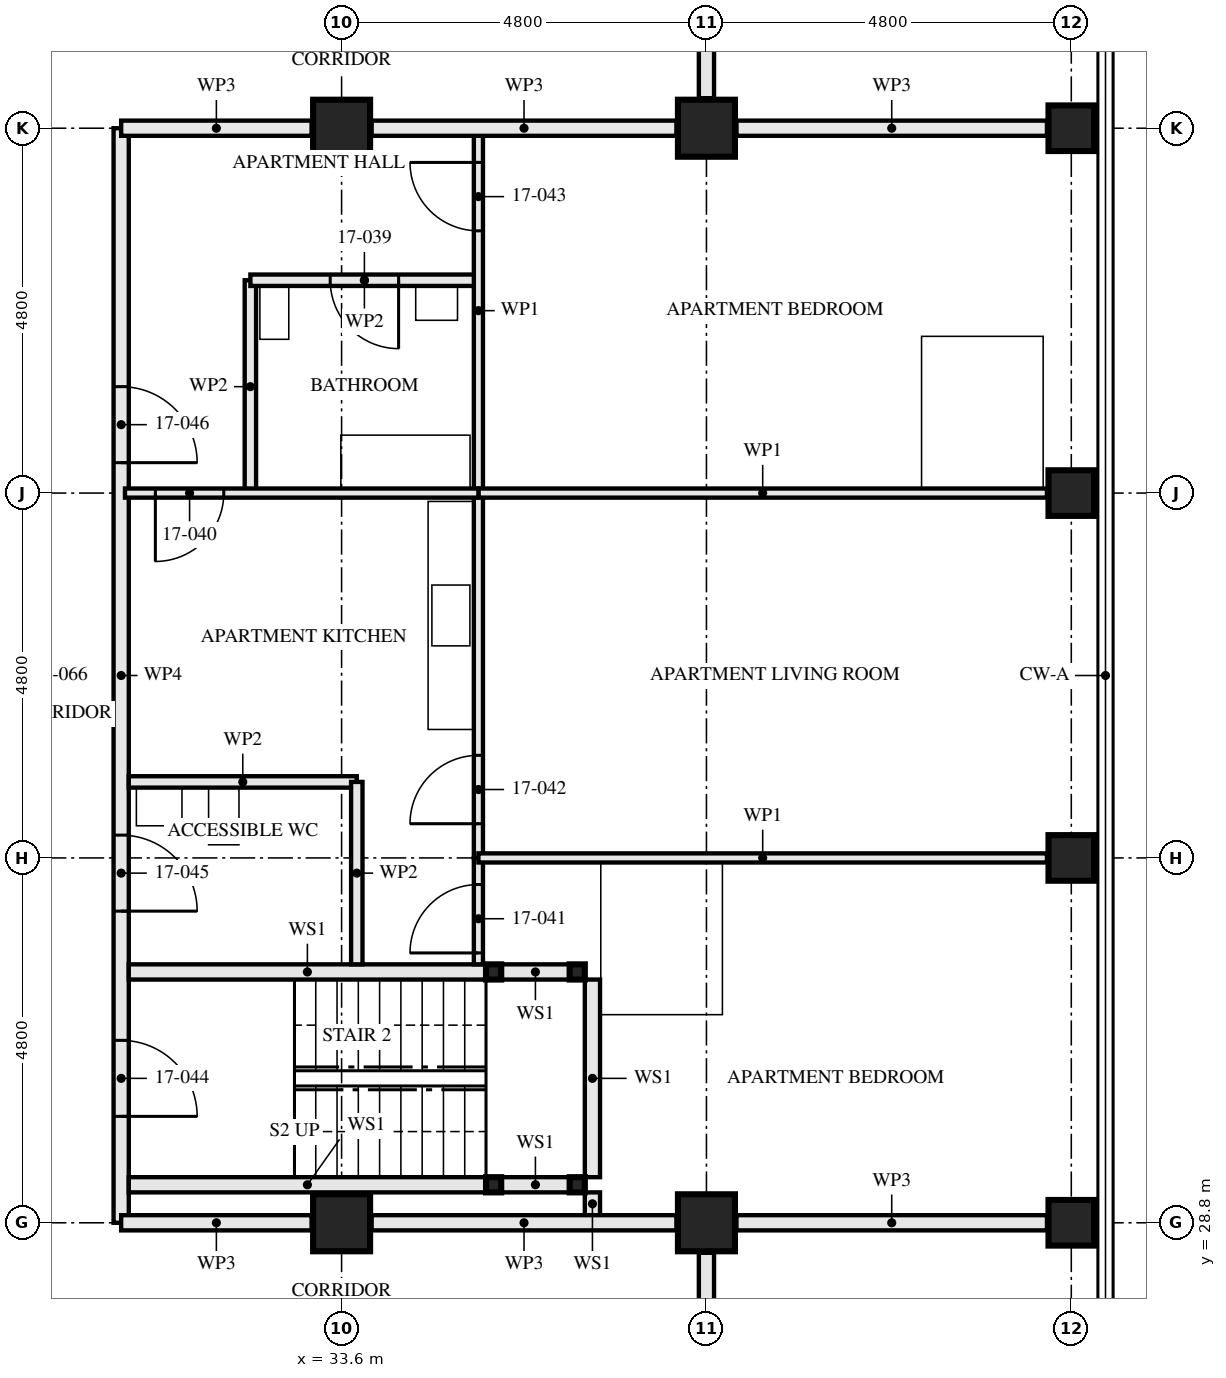
"""IFC4 building model, lengths in metres.
Left out: names, types, materials, properties, quantities, classifications, styles, units other than length and angle.
Written with IfcOpenShell. Run it as: python <this file> out.ifc"""

import sys

from ifc_helpers import new_model, si_unit, direction, frame, frame_2d, origin, origin_2d, place, context, subcontext, project, spatial, rectangle, hollow_rectangle, extrude, element, fill, save


model = new_model("IFC4")
c1 = context("Model", 3, precision=1e-05, world=origin(), true_north=direction((0.0, 1.0)))
c2 = subcontext(c1, "Body", "Model", "MODEL_VIEW")
j1 = project(units=[si_unit("LENGTHUNIT", "METRE"), si_unit("PLANEANGLEUNIT", "RADIAN")], contexts=[c1])
p1 = place(None, origin())
s1 = spatial("IfcSite", under=j1, at=p1, CompositionType="ELEMENT")
p2 = place(p1, origin())
s2 = spatial("IfcBuilding", under=s1, at=p2, CompositionType="ELEMENT")
p3 = place(p2, frame((0.0, 0.0, 65.5)))
s3 = spatial("IfcBuildingStorey", under=s2, at=p3, CompositionType="ELEMENT", Elevation=65.5)
for number, where, z_axis, x_axis in (
    (1, (33.6, 28.8, 0.0), (0.0, 0.0, 1.0), (0.0, 1.0, 0.0)),
    (2, (33.6, 43.2, 0.0), (0.0, 0.0, 1.0), (0.0, 1.0, 0.0)),
    (3, (38.4, 28.8, 0.0), (0.0, 0.0, 1.0), (0.0, 1.0, 0.0)),
    (4, (38.4, 43.2, 0.0), (0.0, 0.0, 1.0), (0.0, 1.0, 0.0)),
):
    element("IfcColumn", number, at=place(p3, frame(where, z_axis=z_axis, x_axis=x_axis)), inside=s3, PredefinedType="COLUMN", context=c2, shape_type="SweptSolid", body=[
        extrude(hollow_rectangle(XDim=0.75, YDim=0.75, WallThickness=0.08, at=origin_2d()), origin(), (0.0, 0.0, 1.0), 3.5),
    ])
for number, where, z_axis, x_axis in (
    (5, (43.2, 28.8, 0.0), (0.0, 0.0, 1.0), (0.0, 1.0, 0.0)),
    (6, (43.2, 33.6, 0.0), (0.0, 0.0, 1.0), (1.0, 0.0, 0.0)),
    (7, (43.2, 38.4, 0.0), (0.0, 0.0, 1.0), (1.0, 0.0, 0.0)),
    (8, (43.2, 43.2, 0.0), (0.0, 0.0, 1.0), (0.0, 1.0, 0.0)),
):
    element("IfcColumn", number, at=place(p3, frame(where, z_axis=z_axis, x_axis=x_axis)), inside=s3, PredefinedType="COLUMN", context=c2, shape_type="SweptSolid", body=[
        extrude(hollow_rectangle(XDim=0.6, YDim=0.6, WallThickness=0.08, at=origin_2d()), origin(), (0.0, 0.0, 1.0), 3.5),
    ])
for number, where, z_axis, x_axis in (
    (9, (36.7, 29.3, 0.0), (0.0, 0.0, 1.0), (1.0, 0.0, 0.0)),
    (10, (36.7, 32.1, 0.0), (0.0, 0.0, 1.0), (1.0, 0.0, 0.0)),
    (11, (35.6, 29.3, 0.0), (0.0, 0.0, 1.0), (1.0, 0.0, 0.0)),
    (12, (35.6, 32.1, 0.0), (0.0, 0.0, 1.0), (1.0, 0.0, 0.0)),
):
    element("IfcColumn", number, at=place(p3, frame(where, z_axis=z_axis, x_axis=x_axis)), inside=s3, PredefinedType="COLUMN", context=c2, shape_type="SweptSolid", body=[
        extrude(hollow_rectangle(XDim=0.2, YDim=0.2, WallThickness=0.008, at=origin_2d()), origin(), (0.0, 0.0, 1.0), 3.33),
    ])
p4 = place(p3, frame((38.4, 26.8, 0.0), z_axis=(0.0, 0.0, 1.0), x_axis=(0.0, 1.0, 0.0)))
e13 = element("IfcWall", 13, at=p4, inside=s3, PredefinedType="PARTITIONING", context=c2, shape_type="SweptSolid", body=[
    extrude(rectangle(XDim=1.605, YDim=0.2, at=frame_2d((0.802, 0.0))), origin(), (0.0, 0.0, 1.0), 3.33),
])
p5 = place(p3, frame((36.6, 29.3, 0.0), z_axis=(0.0, 0.0, 1.0), x_axis=(-1.0, 0.0, 0.0)))
e14 = element("IfcWall", 14, at=p5, inside=s3, PredefinedType="SOLIDWALL", context=c2, shape_type="SweptSolid", body=[
    extrude(rectangle(XDim=0.9, YDim=0.2, at=frame_2d((0.45, 0.0))), origin(), (0.0, 0.0, 1.0), 2.99),
])
p6 = place(p3, frame((35.5, 29.3, 0.0), z_axis=(0.0, 0.0, 1.0), x_axis=(-1.0, 0.0, 0.0)))
e15 = element("IfcWall", 15, at=p6, inside=s3, PredefinedType="SOLIDWALL", context=c2, shape_type="SweptSolid", body=[
    extrude(rectangle(XDim=4.7, YDim=0.2, at=frame_2d((2.35, 0.0))), origin(), (0.0, 0.0, 1.0), 2.99),
])
p7 = place(p3, frame((36.6, 32.1, 0.0), z_axis=(0.0, 0.0, 1.0), x_axis=(-1.0, 0.0, 0.0)))
e16 = element("IfcWall", 16, at=p7, inside=s3, PredefinedType="SOLIDWALL", context=c2, shape_type="SweptSolid", body=[
    extrude(rectangle(XDim=0.9, YDim=0.2, at=frame_2d((0.45, 0.0))), origin(), (0.0, 0.0, 1.0), 2.99),
])
p8 = place(p3, frame((35.5, 32.1, 0.0), z_axis=(0.0, 0.0, 1.0), x_axis=(-1.0, 0.0, 0.0)))
e17 = element("IfcWall", 17, at=p8, inside=s3, PredefinedType="SOLIDWALL", context=c2, shape_type="SweptSolid", body=[
    extrude(rectangle(XDim=4.7, YDim=0.2, at=frame_2d((2.35, 0.0))), origin(), (0.0, 0.0, 1.0), 2.99),
])
p9 = place(p3, frame((36.9, 28.9, 0.0), z_axis=(0.0, 0.0, 1.0), x_axis=(0.0, 1.0, 0.0)))
e18 = element("IfcWall", 18, at=p9, inside=s3, PredefinedType="SOLIDWALL", context=c2, shape_type="SweptSolid", body=[
    extrude(rectangle(XDim=0.3, YDim=0.2, at=frame_2d((0.15, 0.0))), origin(), (0.0, 0.0, 1.0), 3.33),
])
p10 = place(p3, frame((36.9, 29.4, 0.0), z_axis=(0.0, 0.0, 1.0), x_axis=(0.0, 1.0, 0.0)))
e19 = element("IfcWall", 19, at=p10, inside=s3, PredefinedType="SOLIDWALL", context=c2, shape_type="SweptSolid", body=[
    extrude(rectangle(XDim=2.6, YDim=0.2, at=frame_2d((1.3, 0.0))), origin(), (0.0, 0.0, 1.0), 3.33),
])
p11 = place(p3, frame((33.8, 32.2, 0.0), z_axis=(0.0, 0.0, 1.0), x_axis=(0.0, 1.0, 0.0)))
e20 = element("IfcWall", 20, at=p11, inside=s3, PredefinedType="PARTITIONING", context=c2, shape_type="SweptSolid", body=[
    extrude(rectangle(XDim=2.4, YDim=0.15, at=frame_2d((1.2, 0.0))), origin(), (0.0, 0.0, 1.0), 2.55),
])
p12 = place(p3, frame((33.8, 34.6, 0.0), z_axis=(0.0, 0.0, 1.0), x_axis=(-1.0, 0.0, 0.0)))
e21 = element("IfcWall", 21, at=p12, inside=s3, PredefinedType="PARTITIONING", context=c2, shape_type="SweptSolid", body=[
    extrude(rectangle(XDim=3.0, YDim=0.15, at=frame_2d((1.5, 0.0))), origin(), (0.0, 0.0, 1.0), 3.33),
])
p13 = place(p3, frame((35.4, 41.2, 0.0), z_axis=(0.0, 0.0, 1.0), x_axis=(-1.0, 0.0, 0.0)))
e22 = element("IfcWall", 22, at=p13, inside=s3, PredefinedType="PARTITIONING", context=c2, shape_type="SweptSolid", body=[
    extrude(rectangle(XDim=3.0, YDim=0.15, at=frame_2d((1.5, 0.0))), origin(), (0.0, 0.0, 1.0), 3.33),
])
p14 = place(p13, frame((1.05, 0.0, 0.0)))
e23 = element("IfcOpeningElement", 23, at=p14, cuts=e22, PredefinedType="OPENING", context=c2, shape_type="SweptSolid", body=[
    extrude(rectangle(XDim=0.9, YDim=2.1, at=frame_2d((0.45, 1.05))), frame((0.0, 0.085, 0.0), z_axis=(0.0, -1.0, 0.0), x_axis=(1.0, 0.0, 0.0)), (0.0, 0.0, 1.0), 0.171),
])
p15 = place(p3, frame((32.4, 38.4, 0.0), z_axis=(0.0, 0.0, 1.0), x_axis=(0.0, 1.0, 0.0)))
e24 = element("IfcWall", 24, at=p15, inside=s3, PredefinedType="PARTITIONING", context=c2, shape_type="SweptSolid", body=[
    extrude(rectangle(XDim=2.8, YDim=0.15, at=frame_2d((1.4, 0.0))), origin(), (0.0, 0.0, 1.0), 3.33),
])
p16 = place(p3, frame((35.4, 38.4, 0.0), z_axis=(0.0, 0.0, 1.0), x_axis=(-1.0, 0.0, 0.0)))
e25 = element("IfcWall", 25, at=p16, inside=s3, PredefinedType="PARTITIONING", context=c2, shape_type="SweptSolid", body=[
    extrude(rectangle(XDim=4.65, YDim=0.12, at=frame_2d((2.325, 0.0))), origin(), (0.0, 0.0, 1.0), 2.55),
])
p17 = place(p16, frame((3.35, 0.0, 0.0)))
e26 = element("IfcOpeningElement", 26, at=p17, cuts=e25, PredefinedType="OPENING", context=c2, shape_type="SweptSolid", body=[
    extrude(rectangle(XDim=0.9, YDim=2.1, at=frame_2d((0.45, 1.05))), frame((0.0, 0.071, 0.0), z_axis=(0.0, -1.0, 0.0), x_axis=(1.0, 0.0, 0.0)), (0.0, 0.0, 1.0), 0.141),
])
p18 = place(p3, frame((35.4, 32.2, 0.0), z_axis=(0.0, 0.0, 1.0), x_axis=(0.0, 1.0, 0.0)))
e27 = element("IfcWall", 27, at=p18, inside=s3, PredefinedType="PARTITIONING", context=c2, shape_type="SweptSolid", body=[
    extrude(rectangle(XDim=1.4, YDim=0.12, at=frame_2d((0.7, 0.0))), origin(), (0.0, 0.0, 1.0), 3.33),
])
p19 = place(p18, frame((0.15, 0.0, 0.0)))
e28 = element("IfcOpeningElement", 28, at=p19, cuts=e27, PredefinedType="OPENING", context=c2, shape_type="SweptSolid", body=[
    extrude(rectangle(XDim=0.9, YDim=2.1, at=frame_2d((0.45, 1.05))), frame((0.0, 0.071, 0.0), z_axis=(0.0, -1.0, 0.0), x_axis=(1.0, 0.0, 0.0)), (0.0, 0.0, 1.0), 0.141),
])
p20 = place(p3, frame((35.4, 33.6, 0.0), z_axis=(0.0, 0.0, 1.0), x_axis=(0.0, 1.0, 0.0)))
e29 = element("IfcWall", 29, at=p20, inside=s3, PredefinedType="PARTITIONING", context=c2, shape_type="SweptSolid", body=[
    extrude(rectangle(XDim=4.8, YDim=0.12, at=frame_2d((2.4, 0.0))), origin(), (0.0, 0.0, 1.0), 3.33),
])
p21 = place(p20, frame((0.45, 0.0, 0.0)))
e30 = element("IfcOpeningElement", 30, at=p21, cuts=e29, PredefinedType="OPENING", context=c2, shape_type="SweptSolid", body=[
    extrude(rectangle(XDim=0.9, YDim=2.1, at=frame_2d((0.45, 1.05))), frame((0.0, 0.071, 0.0), z_axis=(0.0, -1.0, 0.0), x_axis=(1.0, 0.0, 0.0)), (0.0, 0.0, 1.0), 0.141),
])
p22 = place(p3, frame((35.4, 38.4, 0.0), z_axis=(0.0, 0.0, 1.0), x_axis=(0.0, 1.0, 0.0)))
e31 = element("IfcWall", 31, at=p22, inside=s3, PredefinedType="PARTITIONING", context=c2, shape_type="SweptSolid", body=[
    extrude(rectangle(XDim=4.8, YDim=0.12, at=frame_2d((2.4, 0.0))), origin(), (0.0, 0.0, 1.0), 3.33),
])
p23 = place(p22, frame((3.45, 0.0, 0.0)))
e32 = element("IfcOpeningElement", 32, at=p23, cuts=e31, PredefinedType="OPENING", context=c2, shape_type="SweptSolid", body=[
    extrude(rectangle(XDim=0.9, YDim=2.1, at=frame_2d((0.45, 1.05))), frame((0.0, 0.071, 0.0), z_axis=(0.0, -1.0, 0.0), x_axis=(1.0, 0.0, 0.0)), (0.0, 0.0, 1.0), 0.141),
])
for number, where, z_axis, x_axis in (
    (33, (42.88, 33.6, 0.0), (0.0, 0.0, 1.0), (-1.0, 0.0, 0.0)),
    (34, (42.88, 38.4, 0.0), (0.0, 0.0, 1.0), (-1.0, 0.0, 0.0)),
):
    element("IfcWall", number, at=place(p3, frame(where, z_axis=z_axis, x_axis=x_axis)), inside=s3, PredefinedType="PARTITIONING", context=c2, shape_type="SweptSolid", body=[
        extrude(rectangle(XDim=7.48, YDim=0.12, at=frame_2d((3.74, 0.0))), origin(), (0.0, 0.0, 1.0), 2.55),
    ])
p24 = place(p3, frame((30.7, 28.8, 0.0), z_axis=(0.0, 0.0, 1.0), x_axis=(0.0, 1.0, 0.0)))
e35 = element("IfcWall", 35, at=p24, inside=s3, PredefinedType="PARTITIONING", context=c2, shape_type="SweptSolid", body=[
    extrude(rectangle(XDim=14.4, YDim=0.2, at=frame_2d((7.2, 0.0))), origin(), (0.0, 0.0, 1.0), 2.55),
])
p25 = place(p24, frame((1.4, 0.0, 0.0)))
e36 = element("IfcOpeningElement", 36, at=p25, cuts=e35, PredefinedType="OPENING", context=c2, shape_type="SweptSolid", body=[
    extrude(rectangle(XDim=1.0, YDim=2.1, at=frame_2d((0.5, 1.05))), frame((0.0, 0.111, 0.0), z_axis=(0.0, -1.0, 0.0), x_axis=(1.0, 0.0, 0.0)), (0.0, 0.0, 1.0), 0.221),
])
p26 = place(p24, frame((4.1, 0.0, 0.0)))
e37 = element("IfcOpeningElement", 37, at=p26, cuts=e35, PredefinedType="OPENING", context=c2, shape_type="SweptSolid", body=[
    extrude(rectangle(XDim=1.0, YDim=2.1, at=frame_2d((0.5, 1.05))), frame((0.0, 0.111, 0.0), z_axis=(0.0, -1.0, 0.0), x_axis=(1.0, 0.0, 0.0)), (0.0, 0.0, 1.0), 0.221),
])
p27 = place(p24, frame((10.0, 0.0, 0.0)))
e38 = element("IfcOpeningElement", 38, at=p27, cuts=e35, PredefinedType="OPENING", context=c2, shape_type="SweptSolid", body=[
    extrude(rectangle(XDim=1.0, YDim=2.1, at=frame_2d((0.5, 1.05))), frame((0.0, 0.111, 0.0), z_axis=(0.0, -1.0, 0.0), x_axis=(1.0, 0.0, 0.0)), (0.0, 0.0, 1.0), 0.221),
])
p28 = place(p3, frame((38.4, 45.2, 0.0), z_axis=(0.0, 0.0, 1.0), x_axis=(0.0, -1.0, 0.0)))
e39 = element("IfcWall", 39, at=p28, inside=s3, PredefinedType="PARTITIONING", context=c2, shape_type="SweptSolid", body=[
    extrude(rectangle(XDim=1.605, YDim=0.2, at=frame_2d((0.802, 0.0))), origin(), (0.0, 0.0, 1.0), 3.33),
])
p29 = place(p3, frame((42.88, 28.8, 0.0), z_axis=(0.0, 0.0, 1.0), x_axis=(-1.0, 0.0, 0.0)))
e40 = element("IfcWall", 40, at=p29, inside=s3, PredefinedType="PARTITIONING", context=c2, shape_type="SweptSolid", body=[
    extrude(rectangle(XDim=4.085, YDim=0.2, at=frame_2d((2.042, 0.0))), origin(), (0.0, 0.0, 1.0), 2.32),
])
p30 = place(p3, frame((38.005, 28.8, 0.0), z_axis=(0.0, 0.0, 1.0), x_axis=(-1.0, 0.0, 0.0)))
e41 = element("IfcWall", 41, at=p30, inside=s3, PredefinedType="PARTITIONING", context=c2, shape_type="SweptSolid", body=[
    extrude(rectangle(XDim=4.01, YDim=0.2, at=frame_2d((2.005, 0.0))), origin(), (0.0, 0.0, 1.0), 2.32),
])
p31 = place(p3, frame((33.205, 28.8, 0.0), z_axis=(0.0, 0.0, 1.0), x_axis=(-1.0, 0.0, 0.0)))
e42 = element("IfcWall", 42, at=p31, inside=s3, PredefinedType="PARTITIONING", context=c2, shape_type="SweptSolid", body=[
    extrude(rectangle(XDim=2.505, YDim=0.2, at=frame_2d((1.252, 0.0))), origin(), (0.0, 0.0, 1.0), 2.32),
])
p32 = place(p3, frame((42.88, 43.2, 0.0), z_axis=(0.0, 0.0, 1.0), x_axis=(-1.0, 0.0, 0.0)))
e43 = element("IfcWall", 43, at=p32, inside=s3, PredefinedType="PARTITIONING", context=c2, shape_type="SweptSolid", body=[
    extrude(rectangle(XDim=4.085, YDim=0.2, at=frame_2d((2.042, 0.0))), origin(), (0.0, 0.0, 1.0), 2.32),
])
p33 = place(p3, frame((38.005, 43.2, 0.0), z_axis=(0.0, 0.0, 1.0), x_axis=(-1.0, 0.0, 0.0)))
e44 = element("IfcWall", 44, at=p33, inside=s3, PredefinedType="PARTITIONING", context=c2, shape_type="SweptSolid", body=[
    extrude(rectangle(XDim=4.01, YDim=0.2, at=frame_2d((2.005, 0.0))), origin(), (0.0, 0.0, 1.0), 2.32),
])
p34 = place(p3, frame((33.205, 43.2, 0.0), z_axis=(0.0, 0.0, 1.0), x_axis=(-1.0, 0.0, 0.0)))
e45 = element("IfcWall", 45, at=p34, inside=s3, PredefinedType="PARTITIONING", context=c2, shape_type="SweptSolid", body=[
    extrude(rectangle(XDim=2.505, YDim=0.2, at=frame_2d((1.252, 0.0))), origin(), (0.0, 0.0, 1.0), 2.32),
])
p35 = place(p14, origin())
e46 = element("IfcDoor", 46, at=p35, inside=s3, OperationType="SINGLE_SWING_RIGHT", PredefinedType="DOOR", context=c2, shape_type="SweptSolid", body=[
    extrude(rectangle(XDim=0.9, YDim=2.1, at=frame_2d((0.45, 1.05))), frame((0.0, 0.022, 0.0), z_axis=(0.0, -1.0, 0.0), x_axis=(1.0, 0.0, 0.0)), (0.0, 0.0, 1.0), 0.044),
])
fill(e23, e46)
p36 = place(p17, origin())
e47 = element("IfcDoor", 47, at=p36, inside=s3, OperationType="SINGLE_SWING_LEFT", PredefinedType="DOOR", context=c2, shape_type="SweptSolid", body=[
    extrude(rectangle(XDim=0.9, YDim=2.1, at=frame_2d((0.45, 1.05))), frame((0.0, 0.022, 0.0), z_axis=(0.0, -1.0, 0.0), x_axis=(1.0, 0.0, 0.0)), (0.0, 0.0, 1.0), 0.044),
])
fill(e26, e47)
p37 = place(p19, origin())
e48 = element("IfcDoor", 48, at=p37, inside=s3, OperationType="SINGLE_SWING_RIGHT", PredefinedType="DOOR", context=c2, shape_type="SweptSolid", body=[
    extrude(rectangle(XDim=0.9, YDim=2.1, at=frame_2d((0.45, 1.05))), frame((0.0, 0.022, 0.0), z_axis=(0.0, -1.0, 0.0), x_axis=(1.0, 0.0, 0.0)), (0.0, 0.0, 1.0), 0.044),
])
fill(e28, e48)
p38 = place(p21, origin())
e49 = element("IfcDoor", 49, at=p38, inside=s3, OperationType="SINGLE_SWING_RIGHT", PredefinedType="DOOR", context=c2, shape_type="SweptSolid", body=[
    extrude(rectangle(XDim=0.9, YDim=2.1, at=frame_2d((0.45, 1.05))), frame((0.0, 0.022, 0.0), z_axis=(0.0, -1.0, 0.0), x_axis=(1.0, 0.0, 0.0)), (0.0, 0.0, 1.0), 0.044),
])
fill(e30, e49)
p39 = place(p23, origin())
e50 = element("IfcDoor", 50, at=p39, inside=s3, OperationType="SINGLE_SWING_LEFT", PredefinedType="DOOR", context=c2, shape_type="SweptSolid", body=[
    extrude(rectangle(XDim=0.9, YDim=2.1, at=frame_2d((0.45, 1.05))), frame((0.0, 0.022, 0.0), z_axis=(0.0, -1.0, 0.0), x_axis=(1.0, 0.0, 0.0)), (0.0, 0.0, 1.0), 0.044),
])
fill(e32, e50)
p40 = place(p25, frame((1.0, 0.0, 0.0), z_axis=(0.0, 0.0, 1.0), x_axis=(-1.0, 0.0, 0.0)))
e51 = element("IfcDoor", 51, at=p40, inside=s3, OperationType="SINGLE_SWING_LEFT", PredefinedType="DOOR", context=c2, shape_type="SweptSolid", body=[
    extrude(rectangle(XDim=1.0, YDim=2.1, at=frame_2d((0.5, 1.05))), frame((0.0, 0.032, 0.0), z_axis=(0.0, -1.0, 0.0), x_axis=(1.0, 0.0, 0.0)), (0.0, 0.0, 1.0), 0.064),
])
fill(e36, e51)
p41 = place(p26, frame((1.0, 0.0, 0.0), z_axis=(0.0, 0.0, 1.0), x_axis=(-1.0, 0.0, 0.0)))
e52 = element("IfcDoor", 52, at=p41, inside=s3, OperationType="SINGLE_SWING_LEFT", PredefinedType="DOOR", context=c2, shape_type="SweptSolid", body=[
    extrude(rectangle(XDim=1.0, YDim=2.1, at=frame_2d((0.5, 1.05))), frame((0.0, 0.027, 0.0), z_axis=(0.0, -1.0, 0.0), x_axis=(1.0, 0.0, 0.0)), (0.0, 0.0, 1.0), 0.054),
])
fill(e37, e52)
p42 = place(p27, frame((1.0, 0.0, 0.0), z_axis=(0.0, 0.0, 1.0), x_axis=(-1.0, 0.0, 0.0)))
e53 = element("IfcDoor", 53, at=p42, inside=s3, OperationType="SINGLE_SWING_LEFT", PredefinedType="DOOR", context=c2, shape_type="SweptSolid", body=[
    extrude(rectangle(XDim=1.0, YDim=2.1, at=frame_2d((0.5, 1.05))), frame((0.0, 0.027, 0.0), z_axis=(0.0, -1.0, 0.0), x_axis=(1.0, 0.0, 0.0)), (0.0, 0.0, 1.0), 0.054),
])
fill(e38, e53)
save(model, sys.argv[1])
